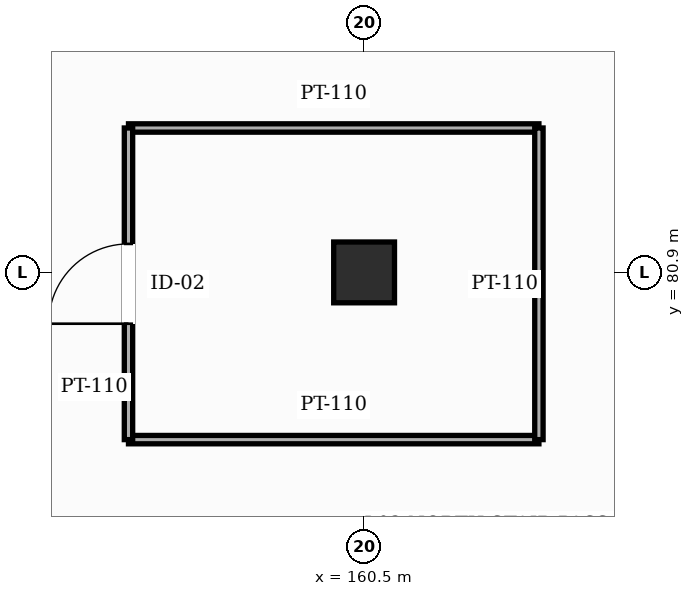
"""IFC4 building model, lengths in metres.
Left out: names, types, materials, properties, quantities, classifications, styles, units other than length and angle.
Written with IfcOpenShell. Run it as: python <this file> out.ifc"""

import sys

from ifc_helpers import new_model, si_unit, direction, frame, frame_2d, origin, origin_2d, place, context, subcontext, project, spatial, rectangle, hollow_rectangle, extrude, element, fill, save


model = new_model("IFC4")
c1 = context("Model", 3, precision=1e-05, world=origin(), true_north=direction((0.0, 1.0)))
c2 = subcontext(c1, "Body", "Model", "MODEL_VIEW")
j1 = project(units=[si_unit("LENGTHUNIT", "METRE"), si_unit("PLANEANGLEUNIT", "RADIAN")], contexts=[c1])
p1 = place(None, origin())
s1 = spatial("IfcSite", under=j1, at=p1, CompositionType="ELEMENT")
p2 = place(p1, origin())
s2 = spatial("IfcBuilding", under=s1, at=p2, CompositionType="ELEMENT")
p3 = place(p2, frame((0.0, 0.0, 10.2)))
s3 = spatial("IfcBuildingStorey", under=s2, at=p3, CompositionType="ELEMENT", Elevation=10.2)
p4 = place(p3, frame((160.5, 80.9, 0.0), z_axis=(0.0, 0.0, 1.0), x_axis=(1.0, 0.0, 0.0)))
e1 = element("IfcColumn", 1, at=p4, inside=s3, PredefinedType="COLUMN", context=c2, shape_type="SweptSolid", body=[
    extrude(hollow_rectangle(XDim=0.8, YDim=0.8, WallThickness=0.032, InnerFilletRadius=0.032, OuterFilletRadius=0.064, at=origin_2d()), origin(), (0.0, 0.0, 1.0), 4.8),
])
for number, where, z_axis, x_axis in (
    (2, (157.4, 78.7, 0.0), (0.0, 0.0, 1.0), (1.0, 0.0, 0.0)),
    (3, (157.4, 82.8, 0.0), (0.0, 0.0, 1.0), (1.0, 0.0, 0.0)),
):
    element("IfcWall", number, at=place(p3, frame(where, z_axis=z_axis, x_axis=x_axis)), inside=s3, PredefinedType="PARTITIONING", context=c2, shape_type="SweptSolid", body=[
        extrude(rectangle(XDim=5.4, YDim=0.11, at=frame_2d((2.7, 0.0))), origin(), (0.0, 0.0, 1.0), 4.545),
    ])
p5 = place(p3, frame((157.4, 78.7, 0.0), z_axis=(0.0, 0.0, 1.0), x_axis=(0.0, 1.0, 0.0)))
e4 = element("IfcWall", 4, at=p5, inside=s3, PredefinedType="PARTITIONING", context=c2, shape_type="SweptSolid", body=[
    extrude(rectangle(XDim=4.1, YDim=0.11, at=frame_2d((2.05, 0.0))), origin(), (0.0, 0.0, 1.0), 4.545),
])
p6 = place(p5, frame((1.525, 0.0, 0.0)))
e5 = element("IfcOpeningElement", 5, at=p6, cuts=e4, PredefinedType="OPENING", context=c2, shape_type="SweptSolid", body=[
    extrude(rectangle(XDim=1.05, YDim=2.2, at=frame_2d((0.525, 1.1))), frame((0.0, 0.065, 0.0), z_axis=(0.0, -1.0, 0.0), x_axis=(1.0, 0.0, 0.0)), (0.0, 0.0, 1.0), 0.13),
])
p7 = place(p3, frame((162.8, 78.7, 0.0), z_axis=(0.0, 0.0, 1.0), x_axis=(0.0, 1.0, 0.0)))
e6 = element("IfcWall", 6, at=p7, inside=s3, PredefinedType="PARTITIONING", context=c2, shape_type="SweptSolid", body=[
    extrude(rectangle(XDim=4.1, YDim=0.11, at=frame_2d((2.05, 0.0))), origin(), (0.0, 0.0, 1.0), 4.545),
])
p8 = place(p6, origin())
e7 = element("IfcDoor", 7, at=p8, inside=s3, OperationType="SINGLE_SWING_LEFT", PredefinedType="DOOR", context=c2, shape_type="SweptSolid", body=[
    extrude(rectangle(XDim=1.05, YDim=2.2, at=frame_2d((0.525, 1.1))), frame((0.0, 0.025, 0.0), z_axis=(0.0, -1.0, 0.0), x_axis=(1.0, 0.0, 0.0)), (0.0, 0.0, 1.0), 0.05),
])
fill(e5, e7)
save(model, sys.argv[1])
